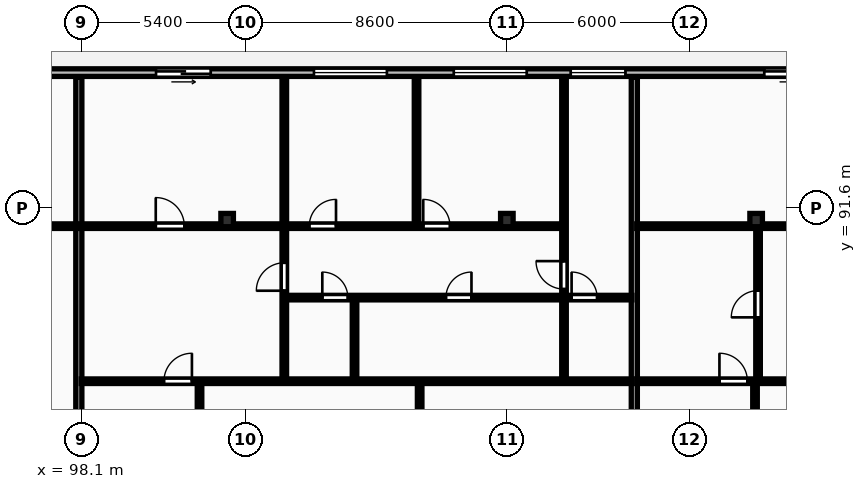
"""IFC4 building model, lengths in metres.
Left out: names, types, materials, properties, quantities, classifications, styles, units other than length and angle.
Written with IfcOpenShell. Run it as: python <this file> out.ifc"""

import sys

from ifc_helpers import new_model, si_unit, direction, frame, frame_2d, origin, origin_2d, place, context, subcontext, project, spatial, rectangle, i_section, extrude, element, fill, save


model = new_model("IFC4")
c1 = context("Model", 3, precision=1e-05, world=origin(), true_north=direction((0.0, 1.0)))
c2 = subcontext(c1, "Body", "Model", "MODEL_VIEW")
j1 = project(units=[si_unit("LENGTHUNIT", "METRE"), si_unit("PLANEANGLEUNIT", "RADIAN")], contexts=[c1])
p1 = place(None, origin())
s1 = spatial("IfcSite", under=j1, at=p1, CompositionType="ELEMENT")
p2 = place(p1, origin())
s2 = spatial("IfcBuilding", under=s1, at=p2, CompositionType="ELEMENT")
p3 = place(p2, frame((0.0, 0.0, 142.9)))
s3 = spatial("IfcBuildingStorey", under=s2, at=p3, CompositionType="ELEMENT", Elevation=142.9)
for number, where, z_axis, x_axis in (
    (1, (102.9, 91.2, 0.0), (0.0, 0.0, 1.0), (1.0, 0.0, 0.0)),
    (2, (112.1, 91.2, 0.0), (0.0, 0.0, 1.0), (1.0, 0.0, 0.0)),
    (3, (120.3, 91.2, 0.0), (0.0, 0.0, 1.0), (1.0, 0.0, 0.0)),
):
    element("IfcColumn", number, at=place(p3, frame(where, z_axis=z_axis, x_axis=x_axis)), inside=s3, PredefinedType="COLUMN", context=c2, shape_type="SweptSolid", body=[
        extrude(i_section(OverallWidth=0.412, OverallDepth=0.437, WebThickness=0.036, FlangeThickness=0.052, FilletRadius=0.015, at=origin_2d()), origin(), (0.0, 0.0, 1.0), 3.6),
    ])
p4 = place(p3, frame((130.6, 96.05, 0.0), z_axis=(0.0, 0.0, 1.0), x_axis=(-1.0, 0.0, 0.0)))
e4 = element("IfcWall", 4, at=p4, inside=s3, PredefinedType="STANDARD", context=c2, shape_type="SweptSolid", body=[
    extrude(rectangle(XDim=73.0, YDim=0.25, at=frame_2d((36.5, 0.0))), origin(), (0.0, 0.0, 1.0), 3.31),
])
p5 = place(p4, frame((67.921, 0.0, 0.0)))
e5 = element("IfcOpeningElement", 5, at=p5, cuts=e4, PredefinedType="OPENING", context=c2, shape_type="SweptSolid", body=[
    extrude(rectangle(XDim=1.8, YDim=2.2, at=frame_2d((0.9, 1.1))), frame((0.0, 0.135, 0.0), z_axis=(0.0, -1.0, 0.0), x_axis=(1.0, 0.0, 0.0)), (0.0, 0.0, 1.0), 0.27),
])
p6 = place(p4, frame((58.084, 0.0, 0.85)))
e6 = element("IfcOpeningElement", 6, at=p6, cuts=e4, PredefinedType="OPENING", context=c2, shape_type="SweptSolid", body=[
    extrude(rectangle(XDim=2.4, YDim=1.9, at=frame_2d((1.2, 0.95))), frame((0.0, 0.135, 0.0), z_axis=(0.0, -1.0, 0.0), x_axis=(1.0, 0.0, 0.0)), (0.0, 0.0, 1.0), 0.27),
])
p7 = place(p4, frame((48.101, 0.0, 0.0)))
e7 = element("IfcOpeningElement", 7, at=p7, cuts=e4, PredefinedType="OPENING", context=c2, shape_type="SweptSolid", body=[
    extrude(rectangle(XDim=1.8, YDim=2.2, at=frame_2d((0.9, 1.1))), frame((0.0, 0.135, 0.0), z_axis=(0.0, -1.0, 0.0), x_axis=(1.0, 0.0, 0.0)), (0.0, 0.0, 1.0), 0.27),
])
p8 = place(p4, frame((37.368, 0.0, 0.85)))
e8 = element("IfcOpeningElement", 8, at=p8, cuts=e4, PredefinedType="OPENING", context=c2, shape_type="SweptSolid", body=[
    extrude(rectangle(XDim=2.4, YDim=1.9, at=frame_2d((1.2, 0.95))), frame((0.0, 0.135, 0.0), z_axis=(0.0, -1.0, 0.0), x_axis=(1.0, 0.0, 0.0)), (0.0, 0.0, 1.0), 0.27),
])
p9 = place(p4, frame((22.445, 0.0, 0.85)))
e9 = element("IfcOpeningElement", 9, at=p9, cuts=e4, PredefinedType="OPENING", context=c2, shape_type="SweptSolid", body=[
    extrude(rectangle(XDim=2.4, YDim=1.9, at=frame_2d((1.2, 0.95))), frame((0.0, 0.135, 0.0), z_axis=(0.0, -1.0, 0.0), x_axis=(1.0, 0.0, 0.0)), (0.0, 0.0, 1.0), 0.27),
])
p10 = place(p4, frame((17.845, 0.0, 0.85)))
e10 = element("IfcOpeningElement", 10, at=p10, cuts=e4, PredefinedType="OPENING", context=c2, shape_type="SweptSolid", body=[
    extrude(rectangle(XDim=2.4, YDim=1.9, at=frame_2d((1.2, 0.95))), frame((0.0, 0.135, 0.0), z_axis=(0.0, -1.0, 0.0), x_axis=(1.0, 0.0, 0.0)), (0.0, 0.0, 1.0), 0.27),
])
p11 = place(p4, frame((28.239, 0.0, 0.0)))
e11 = element("IfcOpeningElement", 11, at=p11, cuts=e4, PredefinedType="OPENING", context=c2, shape_type="SweptSolid", body=[
    extrude(rectangle(XDim=1.8, YDim=2.2, at=frame_2d((0.9, 1.1))), frame((0.0, 0.135, 0.0), z_axis=(0.0, -1.0, 0.0), x_axis=(1.0, 0.0, 0.0)), (0.0, 0.0, 1.0), 0.27),
])
p12 = place(p4, frame((14.599, 0.0, 0.85)))
e12 = element("IfcOpeningElement", 12, at=p12, cuts=e4, PredefinedType="OPENING", context=c2, shape_type="SweptSolid", body=[
    extrude(rectangle(XDim=1.8, YDim=1.8, at=frame_2d((0.9, 0.9))), frame((0.0, 0.135, 0.0), z_axis=(0.0, -1.0, 0.0), x_axis=(1.0, 0.0, 0.0)), (0.0, 0.0, 1.0), 0.27),
])
p13 = place(p4, frame((8.234, 0.0, 0.0)))
e13 = element("IfcOpeningElement", 13, at=p13, cuts=e4, PredefinedType="OPENING", context=c2, shape_type="SweptSolid", body=[
    extrude(rectangle(XDim=1.8, YDim=2.2, at=frame_2d((0.9, 1.1))), frame((0.0, 0.135, 0.0), z_axis=(0.0, -1.0, 0.0), x_axis=(1.0, 0.0, 0.0)), (0.0, 0.0, 1.0), 0.27),
])
p14 = place(p4, frame((0.9, 0.0, 0.85)))
e14 = element("IfcOpeningElement", 14, at=p14, cuts=e4, PredefinedType="OPENING", context=c2, shape_type="SweptSolid", body=[
    extrude(rectangle(XDim=2.4, YDim=1.9, at=frame_2d((1.2, 0.95))), frame((0.0, 0.135, 0.0), z_axis=(0.0, -1.0, 0.0), x_axis=(1.0, 0.0, 0.0)), (0.0, 0.0, 1.0), 0.27),
])
p15 = place(p3, frame((98.021, 69.83, 0.0), z_axis=(0.0, 0.0, 1.0), x_axis=(0.0, 1.0, 0.0)))
e15 = element("IfcWall", 15, at=p15, inside=s3, PredefinedType="PARTITIONING", context=c2, shape_type="SweptSolid", body=[
    extrude(rectangle(XDim=26.07, YDim=0.2, at=frame_2d((13.035, 0.0))), origin(), (0.0, 0.0, 1.0), 3.31),
])
p16 = place(p3, frame((76.994, 91.0, 0.0), z_axis=(0.0, 0.0, 1.0), x_axis=(1.0, 0.0, 0.0)))
e16 = element("IfcWall", 16, at=p16, inside=s3, PredefinedType="PARTITIONING", context=c2, shape_type="SweptSolid", body=[
    extrude(rectangle(XDim=20.947, YDim=0.15, at=frame_2d((10.474, 0.0))), origin(), (0.0, 0.0, 1.0), 3.003),
])
p17 = place(p16, frame((5.042, 0.0, 0.0)))
e17 = element("IfcOpeningElement", 17, at=p17, cuts=e16, PredefinedType="OPENING", context=c2, shape_type="SweptSolid", body=[
    extrude(rectangle(XDim=0.94, YDim=2.1, at=frame_2d((0.47, 1.05))), frame((0.0, 0.085, 0.0), z_axis=(0.0, -1.0, 0.0), x_axis=(1.0, 0.0, 0.0)), (0.0, 0.0, 1.0), 0.17),
])
p18 = place(p16, frame((10.004, 0.0, 0.0)))
e18 = element("IfcOpeningElement", 18, at=p18, cuts=e16, PredefinedType="OPENING", context=c2, shape_type="SweptSolid", body=[
    extrude(rectangle(XDim=0.94, YDim=2.1, at=frame_2d((0.47, 1.05))), frame((0.0, 0.085, 0.0), z_axis=(0.0, -1.0, 0.0), x_axis=(1.0, 0.0, 0.0)), (0.0, 0.0, 1.0), 0.17),
])
p19 = place(p3, frame((116.293, 69.83, 0.0), z_axis=(0.0, 0.0, 1.0), x_axis=(0.0, 1.0, 0.0)))
e19 = element("IfcWall", 19, at=p19, inside=s3, PredefinedType="PARTITIONING", context=c2, shape_type="SweptSolid", body=[
    extrude(rectangle(XDim=26.07, YDim=0.2, at=frame_2d((13.035, 0.0))), origin(), (0.0, 0.0, 1.0), 3.31),
])
p20 = place(p3, frame((109.232, 69.81, 0.0), z_axis=(0.0, 0.0, 1.0), x_axis=(0.0, 1.0, 0.0)))
e20 = element("IfcWall", 20, at=p20, inside=s3, PredefinedType="PARTITIONING", context=c2, shape_type="SweptSolid", body=[
    extrude(rectangle(XDim=16.05, YDim=0.15, at=frame_2d((8.025, 0.0))), origin(), (0.0, 0.0, 1.0), 3.31),
])
p21 = place(p20, frame((6.755, 0.0, 0.0)))
e21 = element("IfcOpeningElement", 21, at=p21, cuts=e20, PredefinedType="OPENING", context=c2, shape_type="SweptSolid", body=[
    extrude(rectangle(XDim=0.84, YDim=2.04, at=frame_2d((0.42, 1.02))), frame((0.0, 0.085, 0.0), z_axis=(0.0, -1.0, 0.0), x_axis=(1.0, 0.0, 0.0)), (0.0, 0.0, 1.0), 0.17),
])
p22 = place(p20, frame((8.095, 0.0, 0.0)))
e22 = element("IfcOpeningElement", 22, at=p22, cuts=e20, PredefinedType="OPENING", context=c2, shape_type="SweptSolid", body=[
    extrude(rectangle(XDim=0.88, YDim=2.06, at=frame_2d((0.44, 1.03))), frame((0.0, 0.085, 0.0), z_axis=(0.0, -1.0, 0.0), x_axis=(1.0, 0.0, 0.0)), (0.0, 0.0, 1.0), 0.17),
])
p23 = place(p3, frame((101.991, 69.81, 0.0), z_axis=(0.0, 0.0, 1.0), x_axis=(0.0, 1.0, 0.0)))
e23 = element("IfcWall", 23, at=p23, inside=s3, PredefinedType="PARTITIONING", context=c2, shape_type="SweptSolid", body=[
    extrude(rectangle(XDim=16.05, YDim=0.15, at=frame_2d((8.025, 0.0))), origin(), (0.0, 0.0, 1.0), 3.31),
])
p24 = place(p23, frame((6.715, 0.0, 0.0)))
e24 = element("IfcOpeningElement", 24, at=p24, cuts=e23, PredefinedType="OPENING", context=c2, shape_type="SweptSolid", body=[
    extrude(rectangle(XDim=0.88, YDim=2.06, at=frame_2d((0.44, 1.03))), frame((0.0, 0.085, 0.0), z_axis=(0.0, -1.0, 0.0), x_axis=(1.0, 0.0, 0.0)), (0.0, 0.0, 1.0), 0.17),
])
p25 = place(p3, frame((107.09, 85.94, 0.0), z_axis=(0.0, 0.0, 1.0), x_axis=(0.0, 1.0, 0.0)))
e25 = element("IfcWall", 25, at=p25, inside=s3, PredefinedType="PARTITIONING", context=c2, shape_type="SweptSolid", body=[
    extrude(rectangle(XDim=2.69, YDim=0.15, at=frame_2d((1.345, 0.0))), origin(), (0.0, 0.0, 1.0), 3.31),
])
p26 = place(p3, frame((109.13, 91.08, 0.0), z_axis=(0.0, 0.0, 1.0), x_axis=(0.0, 1.0, 0.0)))
e26 = element("IfcWall", 26, at=p26, inside=s3, PredefinedType="PARTITIONING", context=c2, shape_type="SweptSolid", body=[
    extrude(rectangle(XDim=4.82, YDim=0.15, at=frame_2d((2.41, 0.0))), origin(), (0.0, 0.0, 1.0), 3.31),
])
p27 = place(p3, frame((104.78, 85.94, 0.0), z_axis=(0.0, 0.0, 1.0), x_axis=(0.0, 1.0, 0.0)))
e27 = element("IfcWall", 27, at=p27, inside=s3, PredefinedType="PARTITIONING", context=c2, shape_type="SweptSolid", body=[
    extrude(rectangle(XDim=9.96, YDim=0.15, at=frame_2d((4.98, 0.0))), origin(), (0.0, 0.0, 1.0), 3.31),
])
p28 = place(p27, frame((2.936, 0.0, 0.0)))
e28 = element("IfcOpeningElement", 28, at=p28, cuts=e27, PredefinedType="OPENING", context=c2, shape_type="SweptSolid", body=[
    extrude(rectangle(XDim=0.92, YDim=2.08, at=frame_2d((0.46, 1.04))), frame((0.0, 0.085, 0.0), z_axis=(0.0, -1.0, 0.0), x_axis=(1.0, 0.0, 0.0)), (0.0, 0.0, 1.0), 0.17),
])
p29 = place(p3, frame((113.98, 85.94, 0.0), z_axis=(0.0, 0.0, 1.0), x_axis=(0.0, 1.0, 0.0)))
e29 = element("IfcWall", 29, at=p29, inside=s3, PredefinedType="PARTITIONING", context=c2, shape_type="SweptSolid", body=[
    extrude(rectangle(XDim=2.69, YDim=0.15, at=frame_2d((1.345, 0.0))), origin(), (0.0, 0.0, 1.0), 3.31),
])
p30 = place(p3, frame((113.98, 88.67, 0.0), z_axis=(0.0, 0.0, 1.0), x_axis=(0.0, 1.0, 0.0)))
e30 = element("IfcWall", 30, at=p30, inside=s3, PredefinedType="PARTITIONING", context=c2, shape_type="SweptSolid", body=[
    extrude(rectangle(XDim=7.23, YDim=0.15, at=frame_2d((3.615, 0.0))), origin(), (0.0, 0.0, 1.0), 3.31),
])
p31 = place(p30, frame((0.26, 0.0, 0.0)))
e31 = element("IfcOpeningElement", 31, at=p31, cuts=e30, PredefinedType="OPENING", context=c2, shape_type="SweptSolid", body=[
    extrude(rectangle(XDim=0.92, YDim=2.08, at=frame_2d((0.46, 1.04))), frame((0.0, 0.085, 0.0), z_axis=(0.0, -1.0, 0.0), x_axis=(1.0, 0.0, 0.0)), (0.0, 0.0, 1.0), 0.17),
])
p32 = place(p3, frame((104.82, 88.65, 0.0), z_axis=(0.0, 0.0, 1.0), x_axis=(1.0, 0.0, 0.0)))
e32 = element("IfcWall", 32, at=p32, inside=s3, PredefinedType="PARTITIONING", context=c2, shape_type="SweptSolid", body=[
    extrude(rectangle(XDim=11.393, YDim=0.15, at=frame_2d((5.696, 0.0))), origin(), (0.0, 0.0, 1.0), 3.31),
])
p33 = place(p32, frame((1.21, 0.0, 0.0)))
e33 = element("IfcOpeningElement", 33, at=p33, cuts=e32, PredefinedType="OPENING", context=c2, shape_type="SweptSolid", body=[
    extrude(rectangle(XDim=0.84, YDim=2.04, at=frame_2d((0.42, 1.02))), frame((0.0, 0.085, 0.0), z_axis=(0.0, -1.0, 0.0), x_axis=(1.0, 0.0, 0.0)), (0.0, 0.0, 1.0), 0.17),
])
p34 = place(p32, frame((5.276, 0.0, 0.0)))
e34 = element("IfcOpeningElement", 34, at=p34, cuts=e32, PredefinedType="OPENING", context=c2, shape_type="SweptSolid", body=[
    extrude(rectangle(XDim=0.84, YDim=2.04, at=frame_2d((0.42, 1.02))), frame((0.0, 0.085, 0.0), z_axis=(0.0, -1.0, 0.0), x_axis=(1.0, 0.0, 0.0)), (0.0, 0.0, 1.0), 0.17),
])
p35 = place(p32, frame((9.41, 0.0, 0.0)))
e35 = element("IfcOpeningElement", 35, at=p35, cuts=e32, PredefinedType="OPENING", context=c2, shape_type="SweptSolid", body=[
    extrude(rectangle(XDim=0.84, YDim=2.04, at=frame_2d((0.42, 1.02))), frame((0.0, 0.085, 0.0), z_axis=(0.0, -1.0, 0.0), x_axis=(1.0, 0.0, 0.0)), (0.0, 0.0, 1.0), 0.17),
])
p36 = place(p3, frame((98.101, 85.9, 0.0), z_axis=(0.0, 0.0, 1.0), x_axis=(1.0, 0.0, 0.0)))
e36 = element("IfcWall", 36, at=p36, inside=s3, PredefinedType="PARTITIONING", context=c2, shape_type="SweptSolid", body=[
    extrude(rectangle(XDim=18.112, YDim=0.15, at=frame_2d((9.056, 0.0))), origin(), (0.0, 0.0, 1.0), 3.31),
])
p37 = place(p36, frame((2.72, 0.0, 0.0)))
e37 = element("IfcOpeningElement", 37, at=p37, cuts=e36, PredefinedType="OPENING", context=c2, shape_type="SweptSolid", body=[
    extrude(rectangle(XDim=0.92, YDim=2.08, at=frame_2d((0.46, 1.04))), frame((0.0, 0.085, 0.0), z_axis=(0.0, -1.0, 0.0), x_axis=(1.0, 0.0, 0.0)), (0.0, 0.0, 1.0), 0.17),
])
p38 = place(p3, frame((98.101, 91.0, 0.0), z_axis=(0.0, 0.0, 1.0), x_axis=(1.0, 0.0, 0.0)))
e38 = element("IfcWall", 38, at=p38, inside=s3, PredefinedType="PARTITIONING", context=c2, shape_type="SweptSolid", body=[
    extrude(rectangle(XDim=15.879, YDim=0.15, at=frame_2d((7.939, 0.0))), origin(), (0.0, 0.0, 1.0), 3.003),
])
p39 = place(p38, frame((2.45, 0.0, 0.0)))
e39 = element("IfcOpeningElement", 39, at=p39, cuts=e38, PredefinedType="OPENING", context=c2, shape_type="SweptSolid", body=[
    extrude(rectangle(XDim=0.94, YDim=2.1, at=frame_2d((0.47, 1.05))), frame((0.0, 0.085, 0.0), z_axis=(0.0, -1.0, 0.0), x_axis=(1.0, 0.0, 0.0)), (0.0, 0.0, 1.0), 0.17),
])
p40 = place(p38, frame((7.499, 0.0, 0.0)))
e40 = element("IfcOpeningElement", 40, at=p40, cuts=e38, PredefinedType="OPENING", context=c2, shape_type="SweptSolid", body=[
    extrude(rectangle(XDim=0.88, YDim=2.06, at=frame_2d((0.44, 1.03))), frame((0.0, 0.085, 0.0), z_axis=(0.0, -1.0, 0.0), x_axis=(1.0, 0.0, 0.0)), (0.0, 0.0, 1.0), 0.17),
])
p41 = place(p38, frame((11.249, 0.0, 0.0)))
e41 = element("IfcOpeningElement", 41, at=p41, cuts=e38, PredefinedType="OPENING", context=c2, shape_type="SweptSolid", body=[
    extrude(rectangle(XDim=0.88, YDim=2.06, at=frame_2d((0.44, 1.03))), frame((0.0, 0.085, 0.0), z_axis=(0.0, -1.0, 0.0), x_axis=(1.0, 0.0, 0.0)), (0.0, 0.0, 1.0), 0.17),
])
p42 = place(p3, frame((120.263, 69.81, 0.0), z_axis=(0.0, 0.0, 1.0), x_axis=(0.0, 1.0, 0.0)))
e42 = element("IfcWall", 42, at=p42, inside=s3, PredefinedType="PARTITIONING", context=c2, shape_type="SweptSolid", body=[
    extrude(rectangle(XDim=16.05, YDim=0.15, at=frame_2d((8.025, 0.0))), origin(), (0.0, 0.0, 1.0), 2.617),
])
p43 = place(p42, frame((6.895, 0.0, 0.0)))
e43 = element("IfcOpeningElement", 43, at=p43, cuts=e42, PredefinedType="OPENING", context=c2, shape_type="SweptSolid", body=[
    extrude(rectangle(XDim=0.88, YDim=2.06, at=frame_2d((0.44, 1.03))), frame((0.0, 0.085, 0.0), z_axis=(0.0, -1.0, 0.0), x_axis=(1.0, 0.0, 0.0)), (0.0, 0.0, 1.0), 0.17),
])
p44 = place(p3, frame((120.363, 85.94, 0.0), z_axis=(0.0, 0.0, 1.0), x_axis=(0.0, 1.0, 0.0)))
e44 = element("IfcWall", 44, at=p44, inside=s3, PredefinedType="PARTITIONING", context=c2, shape_type="SweptSolid", body=[
    extrude(rectangle(XDim=5.0, YDim=0.15, at=frame_2d((2.5, 0.0))), origin(), (0.0, 0.0, 1.0), 2.617),
])
p45 = place(p44, frame((2.06, 0.0, 0.0)))
e45 = element("IfcOpeningElement", 45, at=p45, cuts=e44, PredefinedType="OPENING", context=c2, shape_type="SweptSolid", body=[
    extrude(rectangle(XDim=0.88, YDim=2.06, at=frame_2d((0.44, 1.03))), frame((0.0, 0.085, 0.0), z_axis=(0.0, -1.0, 0.0), x_axis=(1.0, 0.0, 0.0)), (0.0, 0.0, 1.0), 0.17),
])
p46 = place(p3, frame((116.373, 85.9, 0.0), z_axis=(0.0, 0.0, 1.0), x_axis=(1.0, 0.0, 0.0)))
e46 = element("IfcWall", 46, at=p46, inside=s3, PredefinedType="PARTITIONING", context=c2, shape_type="SweptSolid", body=[
    extrude(rectangle(XDim=14.147, YDim=0.15, at=frame_2d((7.074, 0.0))), origin(), (0.0, 0.0, 1.0), 3.31),
])
p47 = place(p46, frame((2.72, 0.0, 0.0)))
e47 = element("IfcOpeningElement", 47, at=p47, cuts=e46, PredefinedType="OPENING", context=c2, shape_type="SweptSolid", body=[
    extrude(rectangle(XDim=0.92, YDim=2.08, at=frame_2d((0.46, 1.04))), frame((0.0, 0.085, 0.0), z_axis=(0.0, -1.0, 0.0), x_axis=(1.0, 0.0, 0.0)), (0.0, 0.0, 1.0), 0.17),
])
p48 = place(p3, frame((116.373, 91.0, 0.0), z_axis=(0.0, 0.0, 1.0), x_axis=(1.0, 0.0, 0.0)))
e48 = element("IfcWall", 48, at=p48, inside=s3, PredefinedType="PARTITIONING", context=c2, shape_type="SweptSolid", body=[
    extrude(rectangle(XDim=14.147, YDim=0.15, at=frame_2d((7.074, 0.0))), origin(), (0.0, 0.0, 1.0), 3.003),
])
p49 = place(p48, frame((6.604, 0.0, 0.0)))
e49 = element("IfcOpeningElement", 49, at=p49, cuts=e48, PredefinedType="OPENING", context=c2, shape_type="SweptSolid", body=[
    extrude(rectangle(XDim=0.94, YDim=2.1, at=frame_2d((0.47, 1.05))), frame((0.0, 0.085, 0.0), z_axis=(0.0, -1.0, 0.0), x_axis=(1.0, 0.0, 0.0)), (0.0, 0.0, 1.0), 0.17),
])
p50 = place(p9, origin())
e50 = element("IfcWindow", 50, at=p50, inside=s3, PartitioningType="DOUBLE_PANEL_VERTICAL", PredefinedType="WINDOW", context=c2, shape_type="SweptSolid", body=[
    extrude(rectangle(XDim=2.4, YDim=1.9, at=frame_2d((1.2, 0.95))), frame((0.0, 0.03, 0.0), z_axis=(0.0, -1.0, 0.0), x_axis=(1.0, 0.0, 0.0)), (0.0, 0.0, 1.0), 0.06),
])
fill(e9, e50)
p51 = place(p10, origin())
e51 = element("IfcWindow", 51, at=p51, inside=s3, PartitioningType="DOUBLE_PANEL_VERTICAL", PredefinedType="WINDOW", context=c2, shape_type="SweptSolid", body=[
    extrude(rectangle(XDim=2.4, YDim=1.9, at=frame_2d((1.2, 0.95))), frame((0.0, 0.03, 0.0), z_axis=(0.0, -1.0, 0.0), x_axis=(1.0, 0.0, 0.0)), (0.0, 0.0, 1.0), 0.06),
])
fill(e10, e51)
p52 = place(p11, origin())
e52 = element("IfcDoor", 52, at=p52, inside=s3, OperationType="SLIDING_TO_LEFT", PredefinedType="DOOR", context=c2, shape_type="SweptSolid", body=[
    extrude(rectangle(XDim=1.8, YDim=2.2, at=frame_2d((0.9, 1.1))), frame((0.0, 0.025, 0.0), z_axis=(0.0, -1.0, 0.0), x_axis=(1.0, 0.0, 0.0)), (0.0, 0.0, 1.0), 0.05),
])
fill(e11, e52)
p53 = place(p12, origin())
e53 = element("IfcWindow", 53, at=p53, inside=s3, PartitioningType="SINGLE_PANEL", PredefinedType="WINDOW", context=c2, shape_type="SweptSolid", body=[
    extrude(rectangle(XDim=1.8, YDim=1.8, at=frame_2d((0.9, 0.9))), frame((0.0, 0.03, 0.0), z_axis=(0.0, -1.0, 0.0), x_axis=(1.0, 0.0, 0.0)), (0.0, 0.0, 1.0), 0.06),
])
fill(e12, e53)
p54 = place(p13, origin())
e54 = element("IfcDoor", 54, at=p54, inside=s3, OperationType="SLIDING_TO_LEFT", PredefinedType="DOOR", context=c2, shape_type="SweptSolid", body=[
    extrude(rectangle(XDim=1.8, YDim=2.2, at=frame_2d((0.9, 1.1))), frame((0.0, 0.025, 0.0), z_axis=(0.0, -1.0, 0.0), x_axis=(1.0, 0.0, 0.0)), (0.0, 0.0, 1.0), 0.05),
])
fill(e13, e54)
p55 = place(p28, origin())
e55 = element("IfcDoor", 55, at=p55, inside=s3, OperationType="SINGLE_SWING_LEFT", PredefinedType="DOOR", context=c2, shape_type="SweptSolid", body=[
    extrude(rectangle(XDim=0.92, YDim=2.08, at=frame_2d((0.46, 1.04))), frame((0.0, 0.025, 0.0), z_axis=(0.0, -1.0, 0.0), x_axis=(1.0, 0.0, 0.0)), (0.0, 0.0, 1.0), 0.05),
])
fill(e28, e55)
p56 = place(p31, origin())
e56 = element("IfcDoor", 56, at=p56, inside=s3, OperationType="SINGLE_SWING_RIGHT", PredefinedType="DOOR", context=c2, shape_type="SweptSolid", body=[
    extrude(rectangle(XDim=0.92, YDim=2.08, at=frame_2d((0.46, 1.04))), frame((0.0, 0.025, 0.0), z_axis=(0.0, -1.0, 0.0), x_axis=(1.0, 0.0, 0.0)), (0.0, 0.0, 1.0), 0.05),
])
fill(e31, e56)
p57 = place(p33, origin())
e57 = element("IfcDoor", 57, at=p57, inside=s3, OperationType="SINGLE_SWING_LEFT", PredefinedType="DOOR", context=c2, shape_type="SweptSolid", body=[
    extrude(rectangle(XDim=0.84, YDim=2.04, at=frame_2d((0.42, 1.02))), frame((0.0, 0.025, 0.0), z_axis=(0.0, -1.0, 0.0), x_axis=(1.0, 0.0, 0.0)), (0.0, 0.0, 1.0), 0.05),
])
fill(e33, e57)
p58 = place(p34, origin())
e58 = element("IfcDoor", 58, at=p58, inside=s3, OperationType="SINGLE_SWING_RIGHT", PredefinedType="DOOR", context=c2, shape_type="SweptSolid", body=[
    extrude(rectangle(XDim=0.84, YDim=2.04, at=frame_2d((0.42, 1.02))), frame((0.0, 0.025, 0.0), z_axis=(0.0, -1.0, 0.0), x_axis=(1.0, 0.0, 0.0)), (0.0, 0.0, 1.0), 0.05),
])
fill(e34, e58)
p59 = place(p35, origin())
e59 = element("IfcDoor", 59, at=p59, inside=s3, OperationType="SINGLE_SWING_LEFT", PredefinedType="DOOR", context=c2, shape_type="SweptSolid", body=[
    extrude(rectangle(XDim=0.84, YDim=2.04, at=frame_2d((0.42, 1.02))), frame((0.0, 0.025, 0.0), z_axis=(0.0, -1.0, 0.0), x_axis=(1.0, 0.0, 0.0)), (0.0, 0.0, 1.0), 0.05),
])
fill(e35, e59)
p60 = place(p37, origin())
e60 = element("IfcDoor", 60, at=p60, inside=s3, OperationType="SINGLE_SWING_RIGHT", PredefinedType="DOOR", context=c2, shape_type="SweptSolid", body=[
    extrude(rectangle(XDim=0.92, YDim=2.08, at=frame_2d((0.46, 1.04))), frame((0.0, 0.025, 0.0), z_axis=(0.0, -1.0, 0.0), x_axis=(1.0, 0.0, 0.0)), (0.0, 0.0, 1.0), 0.05),
])
fill(e37, e60)
p61 = place(p39, origin())
e61 = element("IfcDoor", 61, at=p61, inside=s3, OperationType="SINGLE_SWING_LEFT", PredefinedType="DOOR", context=c2, shape_type="SweptSolid", body=[
    extrude(rectangle(XDim=0.94, YDim=2.1, at=frame_2d((0.47, 1.05))), frame((0.0, 0.025, 0.0), z_axis=(0.0, -1.0, 0.0), x_axis=(1.0, 0.0, 0.0)), (0.0, 0.0, 1.0), 0.05),
])
fill(e39, e61)
p62 = place(p40, origin())
e62 = element("IfcDoor", 62, at=p62, inside=s3, OperationType="SINGLE_SWING_RIGHT", PredefinedType="DOOR", context=c2, shape_type="SweptSolid", body=[
    extrude(rectangle(XDim=0.88, YDim=2.06, at=frame_2d((0.44, 1.03))), frame((0.0, 0.025, 0.0), z_axis=(0.0, -1.0, 0.0), x_axis=(1.0, 0.0, 0.0)), (0.0, 0.0, 1.0), 0.05),
])
fill(e40, e62)
p63 = place(p41, origin())
e63 = element("IfcDoor", 63, at=p63, inside=s3, OperationType="SINGLE_SWING_LEFT", PredefinedType="DOOR", context=c2, shape_type="SweptSolid", body=[
    extrude(rectangle(XDim=0.88, YDim=2.06, at=frame_2d((0.44, 1.03))), frame((0.0, 0.025, 0.0), z_axis=(0.0, -1.0, 0.0), x_axis=(1.0, 0.0, 0.0)), (0.0, 0.0, 1.0), 0.05),
])
fill(e41, e63)
p64 = place(p45, origin())
e64 = element("IfcDoor", 64, at=p64, inside=s3, OperationType="SINGLE_SWING_LEFT", PredefinedType="DOOR", context=c2, shape_type="SweptSolid", body=[
    extrude(rectangle(XDim=0.88, YDim=2.06, at=frame_2d((0.44, 1.03))), frame((0.0, 0.025, 0.0), z_axis=(0.0, -1.0, 0.0), x_axis=(1.0, 0.0, 0.0)), (0.0, 0.0, 1.0), 0.05),
])
fill(e45, e64)
p65 = place(p47, origin())
e65 = element("IfcDoor", 65, at=p65, inside=s3, OperationType="SINGLE_SWING_LEFT", PredefinedType="DOOR", context=c2, shape_type="SweptSolid", body=[
    extrude(rectangle(XDim=0.92, YDim=2.08, at=frame_2d((0.46, 1.04))), frame((0.0, 0.025, 0.0), z_axis=(0.0, -1.0, 0.0), x_axis=(1.0, 0.0, 0.0)), (0.0, 0.0, 1.0), 0.05),
])
fill(e47, e65)
save(model, sys.argv[1])
